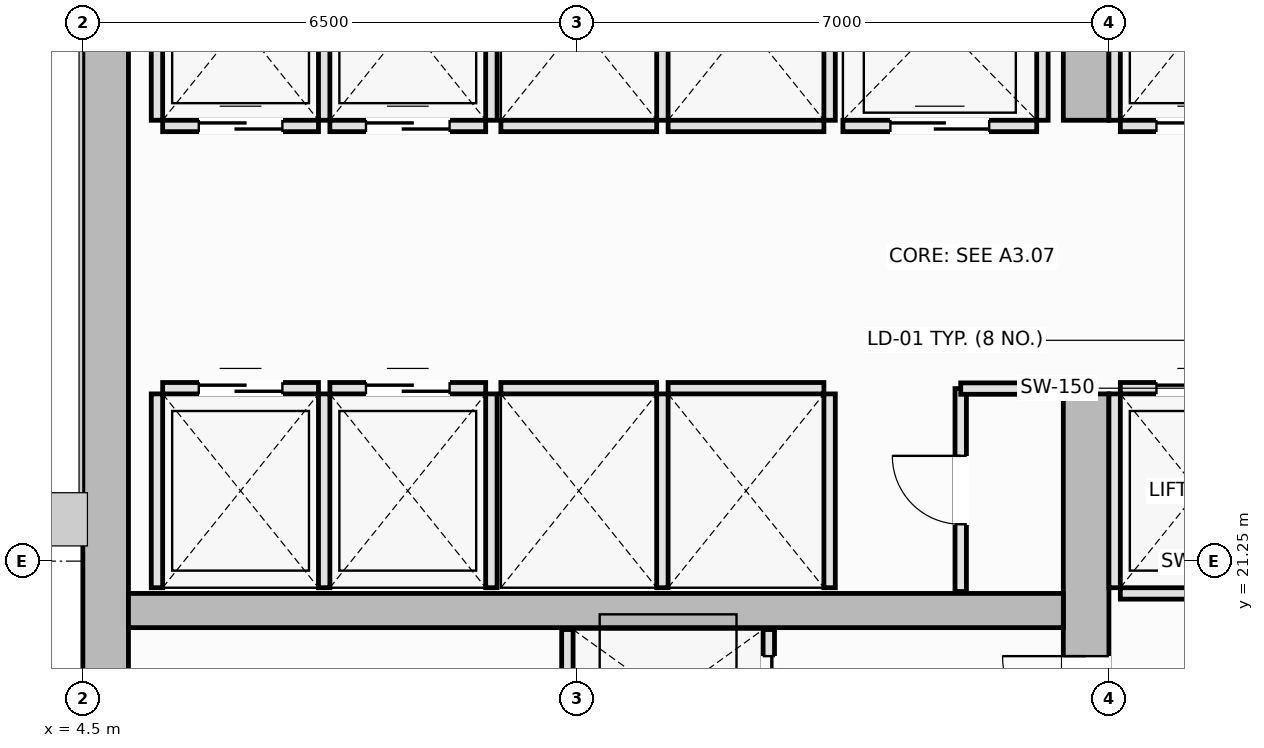
"""IFC4 building model, lengths in metres.
Left out: names, types, materials, properties, quantities, classifications, styles, units other than length and angle.
Written with IfcOpenShell. Run it as: python <this file> out.ifc"""

import sys

from ifc_helpers import new_model, si_unit, direction, frame, frame_2d, origin, place, context, subcontext, project, spatial, rectangle, extrude, element, fill, save


model = new_model("IFC4")
c1 = context("Model", 3, precision=1e-05, world=origin(), true_north=direction((0.0, 1.0)))
c2 = subcontext(c1, "Body", "Model", "MODEL_VIEW")
j1 = project(units=[si_unit("LENGTHUNIT", "METRE"), si_unit("PLANEANGLEUNIT", "RADIAN")], contexts=[c1])
p1 = place(None, origin())
s1 = spatial("IfcSite", under=j1, at=p1, CompositionType="ELEMENT")
p2 = place(p1, origin())
s2 = spatial("IfcBuilding", under=s1, at=p2, CompositionType="ELEMENT")
p3 = place(p2, frame((0.0, 0.0, 97.85)))
s3 = spatial("IfcBuildingStorey", under=s2, at=p3, CompositionType="ELEMENT", Elevation=97.85)
p4 = place(p3, frame((4.8, 14.6, 0.0), z_axis=(0.0, 0.0, 1.0), x_axis=(0.0, 1.0, 0.0)))
e1 = element("IfcWall", 1, at=p4, inside=s3, PredefinedType="SHEAR", context=c2, shape_type="SweptSolid", body=[
    extrude(rectangle(XDim=21.3, YDim=0.6, at=frame_2d((10.65, 0.0))), origin(), (0.0, 0.0, 1.0), 4.4),
])
p5 = place(p3, frame((17.7, 14.6, 0.0), z_axis=(0.0, 0.0, 1.0), x_axis=(0.0, 1.0, 0.0)))
e2 = element("IfcWall", 2, at=p5, inside=s3, PredefinedType="SHEAR", context=c2, shape_type="SweptSolid", body=[
    extrude(rectangle(XDim=8.85, YDim=0.6, at=frame_2d((4.425, 0.0))), origin(), (0.0, 0.0, 1.0), 4.4),
])
p6 = place(p5, frame((4.3, 0.0, 0.0)))
e3 = element("IfcOpeningElement", 3, at=p6, cuts=e2, PredefinedType="OPENING", context=c2, shape_type="SweptSolid", body=[
    extrude(rectangle(XDim=1.1, YDim=2.15, at=frame_2d((0.55, 1.075))), frame((0.0, 0.31, 0.0), z_axis=(0.0, -1.0, 0.0), x_axis=(1.0, 0.0, 0.0)), (0.0, 0.0, 1.0), 0.62),
])
p7 = place(p3, frame((17.7, 27.05, 0.0), z_axis=(0.0, 0.0, 1.0), x_axis=(0.0, 1.0, 0.0)))
e4 = element("IfcWall", 4, at=p7, inside=s3, PredefinedType="SHEAR", context=c2, shape_type="SweptSolid", body=[
    extrude(rectangle(XDim=8.85, YDim=0.6, at=frame_2d((4.425, 0.0))), origin(), (0.0, 0.0, 1.0), 4.4),
])
p8 = place(p7, frame((3.45, 0.0, 0.0)))
e5 = element("IfcOpeningElement", 5, at=p8, cuts=e4, PredefinedType="OPENING", context=c2, shape_type="SweptSolid", body=[
    extrude(rectangle(XDim=1.1, YDim=2.15, at=frame_2d((0.55, 1.075))), frame((0.0, 0.31, 0.0), z_axis=(0.0, -1.0, 0.0), x_axis=(1.0, 0.0, 0.0)), (0.0, 0.0, 1.0), 0.62),
])
p9 = place(p3, frame((5.1, 20.6, 0.0), z_axis=(0.0, 0.0, 1.0), x_axis=(1.0, 0.0, 0.0)))
e6 = element("IfcWall", 6, at=p9, inside=s3, PredefinedType="SHEAR", context=c2, shape_type="SweptSolid", body=[
    extrude(rectangle(XDim=12.3, YDim=0.45, at=frame_2d((6.15, 0.0))), origin(), (0.0, 0.0, 1.0), 4.4),
])
p10 = place(p3, frame((18.15, 20.825, 0.0), z_axis=(0.0, 0.0, 1.0), x_axis=(1.0, 0.0, 0.0)))
e7 = element("IfcWall", 7, at=p10, inside=s3, PredefinedType="PARTITIONING", context=c2, shape_type="SweptSolid", body=[
    extrude(rectangle(XDim=2.05, YDim=0.15, at=frame_2d((1.025, 0.0))), origin(), (0.0, 0.0, 1.0), 4.22),
])
p11 = place(p3, frame((18.15, 23.525, 0.0), z_axis=(0.0, 0.0, 1.0), x_axis=(1.0, 0.0, 0.0)))
e8 = element("IfcWall", 8, at=p11, inside=s3, PredefinedType="PARTITIONING", context=c2, shape_type="SweptSolid", body=[
    extrude(rectangle(XDim=2.05, YDim=0.15, at=frame_2d((1.025, 0.0))), origin(), (0.0, 0.0, 1.0), 4.22),
])
p12 = place(p11, frame((0.475, 0.0, 0.0)))
e9 = element("IfcOpeningElement", 9, at=p12, cuts=e8, PredefinedType="OPENING", context=c2, shape_type="SweptSolid", body=[
    extrude(rectangle(XDim=1.1, YDim=2.2, at=frame_2d((0.55, 1.1))), frame((0.0, 0.085, 0.0), z_axis=(0.0, -1.0, 0.0), x_axis=(1.0, 0.0, 0.0)), (0.0, 0.0, 1.0), 0.17),
])
p13 = place(p3, frame((18.075, 20.9, 0.0), z_axis=(0.0, 0.0, 1.0), x_axis=(0.0, 1.0, 0.0)))
e10 = element("IfcWall", 10, at=p13, inside=s3, PredefinedType="PARTITIONING", context=c2, shape_type="SweptSolid", body=[
    extrude(rectangle(XDim=2.55, YDim=0.15, at=frame_2d((1.275, 0.0))), origin(), (0.0, 0.0, 1.0), 4.22),
])
p14 = place(p3, frame((18.15, 26.975, 0.0), z_axis=(0.0, 0.0, 1.0), x_axis=(1.0, 0.0, 0.0)))
e11 = element("IfcWall", 11, at=p14, inside=s3, PredefinedType="PARTITIONING", context=c2, shape_type="SweptSolid", body=[
    extrude(rectangle(XDim=2.05, YDim=0.15, at=frame_2d((1.025, 0.0))), origin(), (0.0, 0.0, 1.0), 4.22),
])
p15 = place(p14, frame((0.475, 0.0, 0.0)))
e12 = element("IfcOpeningElement", 12, at=p15, cuts=e11, PredefinedType="OPENING", context=c2, shape_type="SweptSolid", body=[
    extrude(rectangle(XDim=1.1, YDim=2.2, at=frame_2d((0.55, 1.1))), frame((0.0, 0.085, 0.0), z_axis=(0.0, -1.0, 0.0), x_axis=(1.0, 0.0, 0.0)), (0.0, 0.0, 1.0), 0.17),
])
p16 = place(p3, frame((18.075, 27.05, 0.0), z_axis=(0.0, 0.0, 1.0), x_axis=(0.0, 1.0, 0.0)))
e13 = element("IfcWall", 13, at=p16, inside=s3, PredefinedType="PARTITIONING", context=c2, shape_type="SweptSolid", body=[
    extrude(rectangle(XDim=2.55, YDim=0.15, at=frame_2d((1.275, 0.0))), origin(), (0.0, 0.0, 1.0), 4.22),
])
p17 = place(p3, frame((5.55, 23.525, 0.0), z_axis=(0.0, 0.0, 1.0), x_axis=(1.0, 0.0, 0.0)))
e14 = element("IfcWall", 14, at=p17, inside=s3, PredefinedType="PARTITIONING", context=c2, shape_type="SweptSolid", body=[
    extrude(rectangle(XDim=2.05, YDim=0.15, at=frame_2d((1.025, 0.0))), origin(), (0.0, 0.0, 1.0), 4.22),
])
p18 = place(p17, frame((0.475, 0.0, 0.0)))
e15 = element("IfcOpeningElement", 15, at=p18, cuts=e14, PredefinedType="OPENING", context=c2, shape_type="SweptSolid", body=[
    extrude(rectangle(XDim=1.1, YDim=2.2, at=frame_2d((0.55, 1.1))), frame((0.0, 0.085, 0.0), z_axis=(0.0, -1.0, 0.0), x_axis=(1.0, 0.0, 0.0)), (0.0, 0.0, 1.0), 0.17),
])
for number, where, z_axis, x_axis in (
    (16, (5.475, 20.9, 0.0), (0.0, 0.0, 1.0), (0.0, 1.0, 0.0)),
    (17, (7.675, 20.9, 0.0), (0.0, 0.0, 1.0), (0.0, 1.0, 0.0)),
):
    element("IfcWall", number, at=place(p3, frame(where, z_axis=z_axis, x_axis=x_axis)), inside=s3, PredefinedType="PARTITIONING", context=c2, shape_type="SweptSolid", body=[
        extrude(rectangle(XDim=2.55, YDim=0.15, at=frame_2d((1.275, 0.0))), origin(), (0.0, 0.0, 1.0), 4.22),
    ])
p19 = place(p3, frame((7.75, 23.525, 0.0), z_axis=(0.0, 0.0, 1.0), x_axis=(1.0, 0.0, 0.0)))
e18 = element("IfcWall", 18, at=p19, inside=s3, PredefinedType="PARTITIONING", context=c2, shape_type="SweptSolid", body=[
    extrude(rectangle(XDim=2.05, YDim=0.15, at=frame_2d((1.025, 0.0))), origin(), (0.0, 0.0, 1.0), 4.22),
])
p20 = place(p19, frame((0.475, 0.0, 0.0)))
e19 = element("IfcOpeningElement", 19, at=p20, cuts=e18, PredefinedType="OPENING", context=c2, shape_type="SweptSolid", body=[
    extrude(rectangle(XDim=1.1, YDim=2.2, at=frame_2d((0.55, 1.1))), frame((0.0, 0.085, 0.0), z_axis=(0.0, -1.0, 0.0), x_axis=(1.0, 0.0, 0.0)), (0.0, 0.0, 1.0), 0.17),
])
p21 = place(p3, frame((9.875, 20.9, 0.0), z_axis=(0.0, 0.0, 1.0), x_axis=(0.0, 1.0, 0.0)))
e20 = element("IfcWall", 20, at=p21, inside=s3, PredefinedType="PARTITIONING", context=c2, shape_type="SweptSolid", body=[
    extrude(rectangle(XDim=2.55, YDim=0.15, at=frame_2d((1.275, 0.0))), origin(), (0.0, 0.0, 1.0), 4.22),
])
p22 = place(p3, frame((5.55, 26.975, 0.0), z_axis=(0.0, 0.0, 1.0), x_axis=(1.0, 0.0, 0.0)))
e21 = element("IfcWall", 21, at=p22, inside=s3, PredefinedType="PARTITIONING", context=c2, shape_type="SweptSolid", body=[
    extrude(rectangle(XDim=2.05, YDim=0.15, at=frame_2d((1.025, 0.0))), origin(), (0.0, 0.0, 1.0), 4.22),
])
p23 = place(p22, frame((0.475, 0.0, 0.0)))
e22 = element("IfcOpeningElement", 22, at=p23, cuts=e21, PredefinedType="OPENING", context=c2, shape_type="SweptSolid", body=[
    extrude(rectangle(XDim=1.1, YDim=2.2, at=frame_2d((0.55, 1.1))), frame((0.0, 0.085, 0.0), z_axis=(0.0, -1.0, 0.0), x_axis=(1.0, 0.0, 0.0)), (0.0, 0.0, 1.0), 0.17),
])
for number, where, z_axis, x_axis in (
    (23, (5.475, 27.05, 0.0), (0.0, 0.0, 1.0), (0.0, 1.0, 0.0)),
    (24, (7.675, 27.05, 0.0), (0.0, 0.0, 1.0), (0.0, 1.0, 0.0)),
):
    element("IfcWall", number, at=place(p3, frame(where, z_axis=z_axis, x_axis=x_axis)), inside=s3, PredefinedType="PARTITIONING", context=c2, shape_type="SweptSolid", body=[
        extrude(rectangle(XDim=2.55, YDim=0.15, at=frame_2d((1.275, 0.0))), origin(), (0.0, 0.0, 1.0), 4.22),
    ])
p24 = place(p3, frame((7.75, 26.975, 0.0), z_axis=(0.0, 0.0, 1.0), x_axis=(1.0, 0.0, 0.0)))
e25 = element("IfcWall", 25, at=p24, inside=s3, PredefinedType="PARTITIONING", context=c2, shape_type="SweptSolid", body=[
    extrude(rectangle(XDim=2.05, YDim=0.15, at=frame_2d((1.025, 0.0))), origin(), (0.0, 0.0, 1.0), 4.22),
])
p25 = place(p24, frame((0.475, 0.0, 0.0)))
e26 = element("IfcOpeningElement", 26, at=p25, cuts=e25, PredefinedType="OPENING", context=c2, shape_type="SweptSolid", body=[
    extrude(rectangle(XDim=1.1, YDim=2.2, at=frame_2d((0.55, 1.1))), frame((0.0, 0.085, 0.0), z_axis=(0.0, -1.0, 0.0), x_axis=(1.0, 0.0, 0.0)), (0.0, 0.0, 1.0), 0.17),
])
p26 = place(p3, frame((9.875, 27.05, 0.0), z_axis=(0.0, 0.0, 1.0), x_axis=(0.0, 1.0, 0.0)))
e27 = element("IfcWall", 27, at=p26, inside=s3, PredefinedType="PARTITIONING", context=c2, shape_type="SweptSolid", body=[
    extrude(rectangle(XDim=2.55, YDim=0.15, at=frame_2d((1.275, 0.0))), origin(), (0.0, 0.0, 1.0), 4.22),
])
p27 = place(p3, frame((10.0, 23.525, 0.0), z_axis=(0.0, 0.0, 1.0), x_axis=(1.0, 0.0, 0.0)))
e28 = element("IfcWall", 28, at=p27, inside=s3, PredefinedType="PARTITIONING", context=c2, shape_type="SweptSolid", body=[
    extrude(rectangle(XDim=2.05, YDim=0.15, at=frame_2d((1.025, 0.0))), origin(), (0.0, 0.0, 1.0), 4.22),
])
p28 = place(p3, frame((12.125, 20.9, 0.0), z_axis=(0.0, 0.0, 1.0), x_axis=(0.0, 1.0, 0.0)))
e29 = element("IfcWall", 29, at=p28, inside=s3, PredefinedType="PARTITIONING", context=c2, shape_type="SweptSolid", body=[
    extrude(rectangle(XDim=2.55, YDim=0.15, at=frame_2d((1.275, 0.0))), origin(), (0.0, 0.0, 1.0), 4.22),
])
p29 = place(p3, frame((12.2, 23.525, 0.0), z_axis=(0.0, 0.0, 1.0), x_axis=(1.0, 0.0, 0.0)))
e30 = element("IfcWall", 30, at=p29, inside=s3, PredefinedType="PARTITIONING", context=c2, shape_type="SweptSolid", body=[
    extrude(rectangle(XDim=2.05, YDim=0.15, at=frame_2d((1.025, 0.0))), origin(), (0.0, 0.0, 1.0), 4.22),
])
p30 = place(p3, frame((14.325, 20.9, 0.0), z_axis=(0.0, 0.0, 1.0), x_axis=(0.0, 1.0, 0.0)))
e31 = element("IfcWall", 31, at=p30, inside=s3, PredefinedType="PARTITIONING", context=c2, shape_type="SweptSolid", body=[
    extrude(rectangle(XDim=2.55, YDim=0.15, at=frame_2d((1.275, 0.0))), origin(), (0.0, 0.0, 1.0), 4.22),
])
p31 = place(p3, frame((10.0, 26.975, 0.0), z_axis=(0.0, 0.0, 1.0), x_axis=(1.0, 0.0, 0.0)))
e32 = element("IfcWall", 32, at=p31, inside=s3, PredefinedType="PARTITIONING", context=c2, shape_type="SweptSolid", body=[
    extrude(rectangle(XDim=2.05, YDim=0.15, at=frame_2d((1.025, 0.0))), origin(), (0.0, 0.0, 1.0), 4.22),
])
p32 = place(p3, frame((12.125, 27.05, 0.0), z_axis=(0.0, 0.0, 1.0), x_axis=(0.0, 1.0, 0.0)))
e33 = element("IfcWall", 33, at=p32, inside=s3, PredefinedType="PARTITIONING", context=c2, shape_type="SweptSolid", body=[
    extrude(rectangle(XDim=2.55, YDim=0.15, at=frame_2d((1.275, 0.0))), origin(), (0.0, 0.0, 1.0), 4.22),
])
p33 = place(p3, frame((12.2, 26.975, 0.0), z_axis=(0.0, 0.0, 1.0), x_axis=(1.0, 0.0, 0.0)))
e34 = element("IfcWall", 34, at=p33, inside=s3, PredefinedType="PARTITIONING", context=c2, shape_type="SweptSolid", body=[
    extrude(rectangle(XDim=2.05, YDim=0.15, at=frame_2d((1.025, 0.0))), origin(), (0.0, 0.0, 1.0), 4.22),
])
p34 = place(p3, frame((14.325, 27.05, 0.0), z_axis=(0.0, 0.0, 1.0), x_axis=(0.0, 1.0, 0.0)))
e35 = element("IfcWall", 35, at=p34, inside=s3, PredefinedType="PARTITIONING", context=c2, shape_type="SweptSolid", body=[
    extrude(rectangle(XDim=2.55, YDim=0.15, at=frame_2d((1.275, 0.0))), origin(), (0.0, 0.0, 1.0), 4.22),
])
p35 = place(p3, frame((14.5, 26.975, 0.0), z_axis=(0.0, 0.0, 1.0), x_axis=(1.0, 0.0, 0.0)))
e36 = element("IfcWall", 36, at=p35, inside=s3, PredefinedType="PARTITIONING", context=c2, shape_type="SweptSolid", body=[
    extrude(rectangle(XDim=2.55, YDim=0.15, at=frame_2d((1.275, 0.0))), origin(), (0.0, 0.0, 1.0), 4.22),
])
p36 = place(p35, frame((0.625, 0.0, 0.0)))
e37 = element("IfcOpeningElement", 37, at=p36, cuts=e36, PredefinedType="OPENING", context=c2, shape_type="SweptSolid", body=[
    extrude(rectangle(XDim=1.3, YDim=2.2, at=frame_2d((0.65, 1.1))), frame((0.0, 0.085, 0.0), z_axis=(0.0, -1.0, 0.0), x_axis=(1.0, 0.0, 0.0)), (0.0, 0.0, 1.0), 0.17),
])
p37 = place(p3, frame((17.125, 27.05, 0.0), z_axis=(0.0, 0.0, 1.0), x_axis=(0.0, 1.0, 0.0)))
e38 = element("IfcWall", 38, at=p37, inside=s3, PredefinedType="PARTITIONING", context=c2, shape_type="SweptSolid", body=[
    extrude(rectangle(XDim=2.6, YDim=0.15, at=frame_2d((1.3, 0.0))), origin(), (0.0, 0.0, 1.0), 4.22),
])
p38 = place(p3, frame((10.875, 18.55, 0.0), z_axis=(0.0, 0.0, 1.0), x_axis=(0.0, 1.0, 0.0)))
e39 = element("IfcWall", 39, at=p38, inside=s3, PredefinedType="PARTITIONING", context=c2, shape_type="SweptSolid", body=[
    extrude(rectangle(XDim=1.8, YDim=0.15, at=frame_2d((0.9, 0.0))), origin(), (0.0, 0.0, 1.0), 4.22),
])
p39 = place(p3, frame((13.525, 18.55, 0.0), z_axis=(0.0, 0.0, 1.0), x_axis=(0.0, 1.0, 0.0)))
e40 = element("IfcWall", 40, at=p39, inside=s3, PredefinedType="PARTITIONING", context=c2, shape_type="SweptSolid", body=[
    extrude(rectangle(XDim=1.8, YDim=0.15, at=frame_2d((0.9, 0.0))), origin(), (0.0, 0.0, 1.0), 4.22),
])
p40 = place(p39, frame((0.35, 0.0, 0.0)))
e41 = element("IfcOpeningElement", 41, at=p40, cuts=e40, PredefinedType="OPENING", context=c2, shape_type="SweptSolid", body=[
    extrude(rectangle(XDim=1.1, YDim=2.2, at=frame_2d((0.55, 1.1))), frame((0.0, 0.085, 0.0), z_axis=(0.0, -1.0, 0.0), x_axis=(1.0, 0.0, 0.0)), (0.0, 0.0, 1.0), 0.17),
])
p41 = place(p3, frame((16.05, 20.85, 0.0), z_axis=(0.0, 0.0, 1.0), x_axis=(0.0, 1.0, 0.0)))
e42 = element("IfcWall", 42, at=p41, inside=s3, PredefinedType="PARTITIONING", context=c2, shape_type="SweptSolid", body=[
    extrude(rectangle(XDim=2.67, YDim=0.15, at=frame_2d((1.335, 0.0))), origin(), (0.0, 0.0, 1.0), 4.22),
])
p42 = place(p41, frame((0.885, 0.0, 0.0)))
e43 = element("IfcOpeningElement", 43, at=p42, cuts=e42, PredefinedType="OPENING", context=c2, shape_type="SweptSolid", body=[
    extrude(rectangle(XDim=0.9, YDim=2.1, at=frame_2d((0.45, 1.05))), frame((0.0, 0.085, 0.0), z_axis=(0.0, -1.0, 0.0), x_axis=(1.0, 0.0, 0.0)), (0.0, 0.0, 1.0), 0.17),
])
p43 = place(p3, frame((16.05, 23.52, 0.0), z_axis=(0.0, 0.0, 1.0), x_axis=(1.0, 0.0, 0.0)))
e44 = element("IfcWall", 44, at=p43, inside=s3, PredefinedType="PARTITIONING", context=c2, shape_type="SweptSolid", body=[
    extrude(rectangle(XDim=1.17, YDim=0.15, at=frame_2d((0.585, 0.0))), origin(), (0.0, 0.0, 1.0), 4.22),
])
p44 = place(p12, origin())
e45 = element("IfcDoor", 45, at=p44, inside=s3, OperationType="DOUBLE_DOOR_SLIDING", PredefinedType="DOOR", context=c2, shape_type="SweptSolid", body=[
    extrude(rectangle(XDim=1.1, YDim=2.2, at=frame_2d((0.55, 1.1))), frame((0.0, 0.025, 0.0), z_axis=(0.0, -1.0, 0.0), x_axis=(1.0, 0.0, 0.0)), (0.0, 0.0, 1.0), 0.05),
])
fill(e9, e45)
p45 = place(p15, origin())
e46 = element("IfcDoor", 46, at=p45, inside=s3, OperationType="DOUBLE_DOOR_SLIDING", PredefinedType="DOOR", context=c2, shape_type="SweptSolid", body=[
    extrude(rectangle(XDim=1.1, YDim=2.2, at=frame_2d((0.55, 1.1))), frame((0.0, 0.025, 0.0), z_axis=(0.0, -1.0, 0.0), x_axis=(1.0, 0.0, 0.0)), (0.0, 0.0, 1.0), 0.05),
])
fill(e12, e46)
p46 = place(p18, origin())
e47 = element("IfcDoor", 47, at=p46, inside=s3, OperationType="DOUBLE_DOOR_SLIDING", PredefinedType="DOOR", context=c2, shape_type="SweptSolid", body=[
    extrude(rectangle(XDim=1.1, YDim=2.2, at=frame_2d((0.55, 1.1))), frame((0.0, 0.025, 0.0), z_axis=(0.0, -1.0, 0.0), x_axis=(1.0, 0.0, 0.0)), (0.0, 0.0, 1.0), 0.05),
])
fill(e15, e47)
p47 = place(p20, origin())
e48 = element("IfcDoor", 48, at=p47, inside=s3, OperationType="DOUBLE_DOOR_SLIDING", PredefinedType="DOOR", context=c2, shape_type="SweptSolid", body=[
    extrude(rectangle(XDim=1.1, YDim=2.2, at=frame_2d((0.55, 1.1))), frame((0.0, 0.025, 0.0), z_axis=(0.0, -1.0, 0.0), x_axis=(1.0, 0.0, 0.0)), (0.0, 0.0, 1.0), 0.05),
])
fill(e19, e48)
p48 = place(p23, origin())
e49 = element("IfcDoor", 49, at=p48, inside=s3, OperationType="DOUBLE_DOOR_SLIDING", PredefinedType="DOOR", context=c2, shape_type="SweptSolid", body=[
    extrude(rectangle(XDim=1.1, YDim=2.2, at=frame_2d((0.55, 1.1))), frame((0.0, 0.025, 0.0), z_axis=(0.0, -1.0, 0.0), x_axis=(1.0, 0.0, 0.0)), (0.0, 0.0, 1.0), 0.05),
])
fill(e22, e49)
p49 = place(p25, origin())
e50 = element("IfcDoor", 50, at=p49, inside=s3, OperationType="DOUBLE_DOOR_SLIDING", PredefinedType="DOOR", context=c2, shape_type="SweptSolid", body=[
    extrude(rectangle(XDim=1.1, YDim=2.2, at=frame_2d((0.55, 1.1))), frame((0.0, 0.025, 0.0), z_axis=(0.0, -1.0, 0.0), x_axis=(1.0, 0.0, 0.0)), (0.0, 0.0, 1.0), 0.05),
])
fill(e26, e50)
p50 = place(p36, origin())
e51 = element("IfcDoor", 51, at=p50, inside=s3, OperationType="DOUBLE_DOOR_SLIDING", PredefinedType="DOOR", context=c2, shape_type="SweptSolid", body=[
    extrude(rectangle(XDim=1.3, YDim=2.2, at=frame_2d((0.65, 1.1))), frame((0.0, 0.025, 0.0), z_axis=(0.0, -1.0, 0.0), x_axis=(1.0, 0.0, 0.0)), (0.0, 0.0, 1.0), 0.05),
])
fill(e37, e51)
p51 = place(p40, origin())
e52 = element("IfcDoor", 52, at=p51, inside=s3, OperationType="DOUBLE_DOOR_SLIDING", PredefinedType="DOOR", context=c2, shape_type="SweptSolid", body=[
    extrude(rectangle(XDim=1.1, YDim=2.2, at=frame_2d((0.55, 1.1))), frame((0.0, 0.025, 0.0), z_axis=(0.0, -1.0, 0.0), x_axis=(1.0, 0.0, 0.0)), (0.0, 0.0, 1.0), 0.05),
])
fill(e41, e52)
p52 = place(p6, origin())
e53 = element("IfcDoor", 53, at=p52, inside=s3, OperationType="SINGLE_SWING_RIGHT", PredefinedType="DOOR", context=c2, shape_type="SweptSolid", body=[
    extrude(rectangle(XDim=1.1, YDim=2.15, at=frame_2d((0.55, 1.075))), frame((0.0, 0.025, 0.0), z_axis=(0.0, -1.0, 0.0), x_axis=(1.0, 0.0, 0.0)), (0.0, 0.0, 1.0), 0.05),
])
fill(e3, e53)
p53 = place(p42, origin())
e54 = element("IfcDoor", 54, at=p53, inside=s3, OperationType="SINGLE_SWING_RIGHT", PredefinedType="DOOR", context=c2, shape_type="SweptSolid", body=[
    extrude(rectangle(XDim=0.9, YDim=2.1, at=frame_2d((0.45, 1.05))), frame((0.0, 0.025, 0.0), z_axis=(0.0, -1.0, 0.0), x_axis=(1.0, 0.0, 0.0)), (0.0, 0.0, 1.0), 0.05),
])
fill(e43, e54)
save(model, sys.argv[1])
